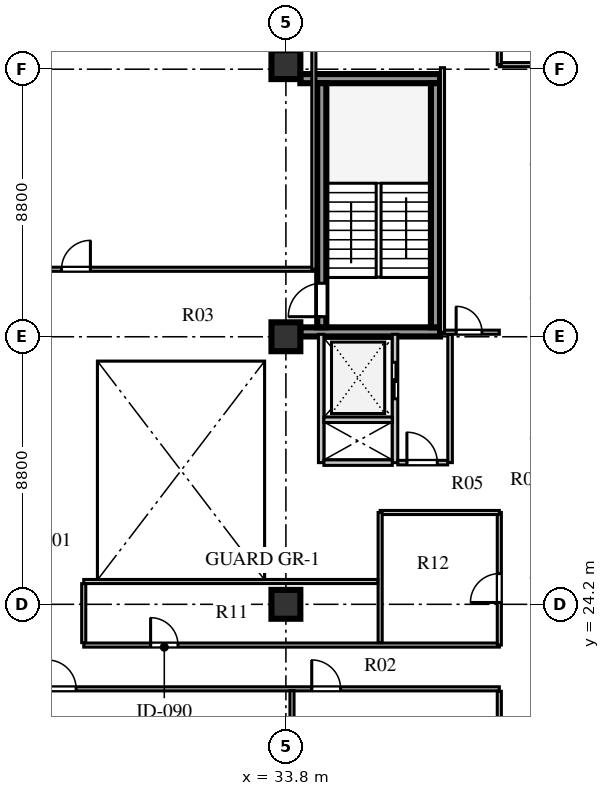
"""IFC4 building model, lengths in metres.
Left out: names, types, materials, properties, quantities, classifications, styles, units other than length and angle.
Written with IfcOpenShell. Run it as: python <this file> out.ifc"""

import sys

from ifc_helpers import new_model, si_unit, direction, frame, frame_2d, origin, origin_2d, place, context, subcontext, project, spatial, rectangle, extrude, element, fill, save


model = new_model("IFC4")
c1 = context("Model", 3, precision=1e-05, world=origin(), true_north=direction((0.0, 1.0)))
c2 = subcontext(c1, "Body", "Model", "MODEL_VIEW")
j1 = project(units=[si_unit("LENGTHUNIT", "METRE"), si_unit("PLANEANGLEUNIT", "RADIAN")], contexts=[c1])
p1 = place(None, origin())
s1 = spatial("IfcSite", under=j1, at=p1, CompositionType="ELEMENT")
p2 = place(p1, origin())
s2 = spatial("IfcBuilding", under=s1, at=p2, CompositionType="ELEMENT")
p3 = place(p2, frame((0.0, 0.0, 188.7)))
s3 = spatial("IfcBuildingStorey", under=s2, at=p3, CompositionType="ELEMENT", Elevation=188.7)
for number, where, z_axis, x_axis in (
    (1, (34.275, 33.16, 0.0), (0.0, 0.0, 1.0), (1.0, 0.0, 0.0)),
    (2, (34.275, 41.49, 0.0), (0.0, 0.0, 1.0), (1.0, 0.0, 0.0)),
):
    element("IfcWall", number, at=place(p3, frame(where, z_axis=z_axis, x_axis=x_axis)), inside=s3, PredefinedType="SHEAR", context=c2, shape_type="SweptSolid", body=[
        extrude(rectangle(XDim=4.595, YDim=0.3, at=frame_2d((2.298, 0.0))), origin(), (0.0, 0.0, 1.0), 3.6),
    ])
p4 = place(p3, frame((34.98, 33.31, 0.0), z_axis=(0.0, 0.0, 1.0), x_axis=(0.0, 1.0, 0.0)))
e3 = element("IfcWall", 3, at=p4, inside=s3, PredefinedType="SHEAR", context=c2, shape_type="SweptSolid", body=[
    extrude(rectangle(XDim=8.03, YDim=0.3, at=frame_2d((4.015, 0.0))), origin(), (0.0, 0.0, 1.0), 3.6),
])
p5 = place(p4, frame((0.35, 0.0, 0.0)))
e4 = element("IfcOpeningElement", 4, at=p5, cuts=e3, PredefinedType="OPENING", context=c2, shape_type="SweptSolid", body=[
    extrude(rectangle(XDim=1.1, YDim=2.1, at=frame_2d((0.55, 1.05))), frame((0.0, 0.16, 0.0), z_axis=(0.0, -1.0, 0.0), x_axis=(1.0, 0.0, 0.0)), (0.0, 0.0, 1.0), 0.32),
])
p6 = place(p3, frame((38.72, 33.31, 0.0), z_axis=(0.0, 0.0, 1.0), x_axis=(0.0, 1.0, 0.0)))
e5 = element("IfcWall", 5, at=p6, inside=s3, PredefinedType="SHEAR", context=c2, shape_type="SweptSolid", body=[
    extrude(rectangle(XDim=8.03, YDim=0.3, at=frame_2d((4.015, 0.0))), origin(), (0.0, 0.0, 1.0), 3.6),
])
for number, where, z_axis, x_axis in (
    (6, (33.8, 24.2, 0.0), (0.0, 0.0, 1.0), (1.0, 0.0, 0.0)),
    (7, (33.8, 33.0, 0.0), (0.0, 0.0, 1.0), (1.0, 0.0, 0.0)),
    (8, (33.8, 41.95, 0.0), (0.0, 0.0, 1.0), (1.0, 0.0, 0.0)),
):
    element("IfcColumn", number, at=place(p3, frame(where, z_axis=z_axis, x_axis=x_axis)), inside=s3, PredefinedType="COLUMN", context=c2, shape_type="SweptSolid", body=[
        extrude(rectangle(XDim=0.95, YDim=0.95, at=origin_2d()), origin(), (0.0, 0.0, 1.0), 3.6),
    ])
p7 = place(p3, frame((34.96, 28.86, 0.0), z_axis=(0.0, 0.0, 1.0), x_axis=(0.0, 1.0, 0.0)))
e9 = element("IfcWall", 9, at=p7, inside=s3, PredefinedType="SOLIDWALL", context=c2, shape_type="SweptSolid", body=[
    extrude(rectangle(XDim=4.22, YDim=0.18, at=frame_2d((2.11, 0.0))), origin(), (0.0, 0.0, 1.0), 3.6),
])
p8 = place(p3, frame((37.39, 28.86, 0.0), z_axis=(0.0, 0.0, 1.0), x_axis=(0.0, 1.0, 0.0)))
e10 = element("IfcWall", 10, at=p8, inside=s3, PredefinedType="SOLIDWALL", context=c2, shape_type="SweptSolid", body=[
    extrude(rectangle(XDim=4.22, YDim=0.18, at=frame_2d((2.11, 0.0))), origin(), (0.0, 0.0, 1.0), 3.6),
])
p9 = place(p8, frame((2.1, 0.0, 0.0)))
e11 = element("IfcOpeningElement", 11, at=p9, cuts=e10, PredefinedType="OPENING", context=c2, shape_type="SweptSolid", body=[
    extrude(rectangle(XDim=1.2, YDim=2.12, at=frame_2d((0.6, 1.06))), frame((0.0, 0.1, 0.0), z_axis=(0.0, -1.0, 0.0), x_axis=(1.0, 0.0, 0.0)), (0.0, 0.0, 1.0), 0.2),
])
for number, where, z_axis, x_axis in (
    (12, (35.05, 28.86, 0.0), (0.0, 0.0, 1.0), (1.0, 0.0, 0.0)),
    (13, (35.05, 30.27, 0.0), (0.0, 0.0, 1.0), (1.0, 0.0, 0.0)),
):
    element("IfcWall", number, at=place(p3, frame(where, z_axis=z_axis, x_axis=x_axis)), inside=s3, PredefinedType="SOLIDWALL", context=c2, shape_type="SweptSolid", body=[
        extrude(rectangle(XDim=2.25, YDim=0.18, at=frame_2d((1.125, 0.0))), origin(), (0.0, 0.0, 1.0), 3.6),
    ])
p10 = place(p3, frame((39.2, 28.86, 0.0), z_axis=(0.0, 0.0, 1.0), x_axis=(0.0, 1.0, 0.0)))
e14 = element("IfcWall", 14, at=p10, inside=s3, PredefinedType="PARTITIONING", context=c2, shape_type="SweptSolid", body=[
    extrude(rectangle(XDim=4.22, YDim=0.15, at=frame_2d((2.11, 0.0))), origin(), (0.0, 0.0, 1.0), 3.6),
])
p11 = place(p3, frame((37.48, 28.86, 0.0), z_axis=(0.0, 0.0, 1.0), x_axis=(1.0, 0.0, 0.0)))
e15 = element("IfcWall", 15, at=p11, inside=s3, PredefinedType="PARTITIONING", context=c2, shape_type="SweptSolid", body=[
    extrude(rectangle(XDim=1.64, YDim=0.15, at=frame_2d((0.82, 0.0))), origin(), (0.0, 0.0, 1.0), 3.6),
])
p12 = place(p11, frame((0.3, 0.0, 0.0)))
e16 = element("IfcOpeningElement", 16, at=p12, cuts=e15, PredefinedType="OPENING", context=c2, shape_type="SweptSolid", body=[
    extrude(rectangle(XDim=1.0, YDim=2.1, at=frame_2d((0.5, 1.05))), frame((0.0, 0.085, 0.0), z_axis=(0.0, -1.0, 0.0), x_axis=(1.0, 0.0, 0.0)), (0.0, 0.0, 1.0), 0.17),
])
p13 = place(p3, frame((25.22, 21.42, 0.0), z_axis=(0.0, 0.0, 1.0), x_axis=(1.0, 0.0, 0.0)))
e17 = element("IfcWall", 17, at=p13, inside=s3, PredefinedType="PARTITIONING", context=c2, shape_type="SweptSolid", body=[
    extrude(rectangle(XDim=15.6, YDim=0.135, at=frame_2d((7.8, 0.0))), origin(), (0.0, 0.0, 1.0), 3.25),
])
p14 = place(p13, frame((0.73, 0.0, 0.0)))
e18 = element("IfcOpeningElement", 18, at=p14, cuts=e17, PredefinedType="OPENING", context=c2, shape_type="SweptSolid", body=[
    extrude(rectangle(XDim=0.95, YDim=2.1, at=frame_2d((0.475, 1.05))), frame((0.0, 0.078, 0.0), z_axis=(0.0, -1.0, 0.0), x_axis=(1.0, 0.0, 0.0)), (0.0, 0.0, 1.0), 0.155),
])
p15 = place(p13, frame((9.43, 0.0, 0.0)))
e19 = element("IfcOpeningElement", 19, at=p15, cuts=e17, PredefinedType="OPENING", context=c2, shape_type="SweptSolid", body=[
    extrude(rectangle(XDim=0.95, YDim=2.1, at=frame_2d((0.475, 1.05))), frame((0.0, 0.078, 0.0), z_axis=(0.0, -1.0, 0.0), x_axis=(1.0, 0.0, 0.0)), (0.0, 0.0, 1.0), 0.155),
])
p16 = place(p3, frame((27.15, 22.86, 0.0), z_axis=(0.0, 0.0, 1.0), x_axis=(1.0, 0.0, 0.0)))
e20 = element("IfcWall", 20, at=p16, inside=s3, PredefinedType="PARTITIONING", context=c2, shape_type="SweptSolid", body=[
    extrude(rectangle(XDim=13.67, YDim=0.135, at=frame_2d((6.835, 0.0))), origin(), (0.0, 0.0, 1.0), 3.6),
])
p17 = place(p16, frame((2.2, 0.0, 0.0)))
e21 = element("IfcOpeningElement", 21, at=p17, cuts=e20, PredefinedType="OPENING", context=c2, shape_type="SweptSolid", body=[
    extrude(rectangle(XDim=0.9, YDim=2.08, at=frame_2d((0.45, 1.04))), frame((0.0, 0.078, 0.0), z_axis=(0.0, -1.0, 0.0), x_axis=(1.0, 0.0, 0.0)), (0.0, 0.0, 1.0), 0.155),
])
p18 = place(p3, frame((25.22, 35.22, 0.0), z_axis=(0.0, 0.0, 1.0), x_axis=(1.0, 0.0, 0.0)))
e22 = element("IfcWall", 22, at=p18, inside=s3, PredefinedType="PARTITIONING", context=c2, shape_type="SweptSolid", body=[
    extrude(rectangle(XDim=9.5, YDim=0.135, at=frame_2d((4.75, 0.0))), origin(), (0.0, 0.0, 1.0), 3.6),
])
p19 = place(p18, frame((1.2, 0.0, 0.0)))
e23 = element("IfcOpeningElement", 23, at=p19, cuts=e22, PredefinedType="OPENING", context=c2, shape_type="SweptSolid", body=[
    extrude(rectangle(XDim=0.95, YDim=2.1, at=frame_2d((0.475, 1.05))), frame((0.0, 0.078, 0.0), z_axis=(0.0, -1.0, 0.0), x_axis=(1.0, 0.0, 0.0)), (0.0, 0.0, 1.0), 0.155),
])
p20 = place(p3, frame((40.82, 41.95, 0.0), z_axis=(0.0, 0.0, 1.0), x_axis=(1.0, 0.0, 0.0)))
e24 = element("IfcWall", 24, at=p20, inside=s3, PredefinedType="PARTITIONING", context=c2, shape_type="SweptSolid", body=[
    extrude(rectangle(XDim=9.7, YDim=0.135, at=frame_2d((4.85, 0.0))), origin(), (0.0, 0.0, 1.0), 2.95),
])
p21 = place(p3, frame((40.82, 22.86, 0.0), z_axis=(0.0, 0.0, 1.0), x_axis=(0.0, 1.0, 0.0)))
e25 = element("IfcWall", 25, at=p21, inside=s3, PredefinedType="PARTITIONING", context=c2, shape_type="SweptSolid", body=[
    extrude(rectangle(XDim=4.36, YDim=0.135, at=frame_2d((2.18, 0.0))), origin(), (0.0, 0.0, 1.0), 3.6),
])
p22 = place(p21, frame((1.4, 0.0, 0.0)))
e26 = element("IfcOpeningElement", 26, at=p22, cuts=e25, PredefinedType="OPENING", context=c2, shape_type="SweptSolid", body=[
    extrude(rectangle(XDim=0.95, YDim=2.1, at=frame_2d((0.475, 1.05))), frame((0.0, 0.078, 0.0), z_axis=(0.0, -1.0, 0.0), x_axis=(1.0, 0.0, 0.0)), (0.0, 0.0, 1.0), 0.155),
])
p23 = place(p3, frame((36.9, 27.22, 0.0), z_axis=(0.0, 0.0, 1.0), x_axis=(1.0, 0.0, 0.0)))
e27 = element("IfcWall", 27, at=p23, inside=s3, PredefinedType="PARTITIONING", context=c2, shape_type="SweptSolid", body=[
    extrude(rectangle(XDim=3.92, YDim=0.135, at=frame_2d((1.96, 0.0))), origin(), (0.0, 0.0, 1.0), 3.25),
])
p24 = place(p3, frame((36.9, 22.94, 0.0), z_axis=(0.0, 0.0, 1.0), x_axis=(0.0, 1.0, 0.0)))
e28 = element("IfcWall", 28, at=p24, inside=s3, PredefinedType="PARTITIONING", context=c2, shape_type="SweptSolid", body=[
    extrude(rectangle(XDim=4.28, YDim=0.135, at=frame_2d((2.14, 0.0))), origin(), (0.0, 0.0, 1.0), 3.6),
])
p25 = place(p3, frame((27.15, 24.95, 0.0), z_axis=(0.0, 0.0, 1.0), x_axis=(1.0, 0.0, 0.0)))
e29 = element("IfcWall", 29, at=p25, inside=s3, PredefinedType="PARTITIONING", context=c2, shape_type="SweptSolid", body=[
    extrude(rectangle(XDim=9.67, YDim=0.135, at=frame_2d((4.835, 0.0))), origin(), (0.0, 0.0, 1.0), 3.05),
])
p26 = place(p3, frame((27.15, 22.94, 0.0), z_axis=(0.0, 0.0, 1.0), x_axis=(0.0, 1.0, 0.0)))
e30 = element("IfcWall", 30, at=p26, inside=s3, PredefinedType="PARTITIONING", context=c2, shape_type="SweptSolid", body=[
    extrude(rectangle(XDim=1.94, YDim=0.135, at=frame_2d((0.97, 0.0))), origin(), (0.0, 0.0, 1.0), 3.6),
])
p27 = place(p3, frame((40.82, 7.88, 0.0), z_axis=(0.0, 0.0, 1.0), x_axis=(0.0, 1.0, 0.0)))
e31 = element("IfcWall", 31, at=p27, inside=s3, PredefinedType="PARTITIONING", context=c2, shape_type="SweptSolid", body=[
    extrude(rectangle(XDim=13.46, YDim=0.135, at=frame_2d((6.73, 0.0))), origin(), (0.0, 0.0, 1.0), 3.6),
])
p28 = place(p3, frame((34.0, 7.88, 0.0), z_axis=(0.0, 0.0, 1.0), x_axis=(0.0, 1.0, 0.0)))
e32 = element("IfcWall", 32, at=p28, inside=s3, PredefinedType="PARTITIONING", context=c2, shape_type="SweptSolid", body=[
    extrude(rectangle(XDim=13.48, YDim=0.135, at=frame_2d((6.74, 0.0))), origin(), (0.0, 0.0, 1.0), 2.95),
])
p29 = place(p3, frame((34.72, 35.22, 0.0), z_axis=(0.0, 0.0, 1.0), x_axis=(0.0, 1.0, 0.0)))
e33 = element("IfcWall", 33, at=p29, inside=s3, PredefinedType="PARTITIONING", context=c2, shape_type="SweptSolid", body=[
    extrude(rectangle(XDim=14.1, YDim=0.135, at=frame_2d((7.05, 0.0))), origin(), (0.0, 0.0, 1.0), 3.6),
])
p30 = place(p3, frame((38.95, 33.15, 0.0), z_axis=(0.0, 0.0, 1.0), x_axis=(1.0, 0.0, 0.0)))
e34 = element("IfcWall", 34, at=p30, inside=s3, PredefinedType="PARTITIONING", context=c2, shape_type="SweptSolid", body=[
    extrude(rectangle(XDim=1.87, YDim=0.135, at=frame_2d((0.935, 0.0))), origin(), (0.0, 0.0, 1.0), 3.6),
])
p31 = place(p30, frame((0.45, 0.0, 0.0)))
e35 = element("IfcOpeningElement", 35, at=p31, cuts=e34, PredefinedType="OPENING", context=c2, shape_type="SweptSolid", body=[
    extrude(rectangle(XDim=0.85, YDim=2.05, at=frame_2d((0.425, 1.025))), frame((0.0, 0.078, 0.0), z_axis=(0.0, -1.0, 0.0), x_axis=(1.0, 0.0, 0.0)), (0.0, 0.0, 1.0), 0.155),
])
p32 = place(p3, frame((38.95, 33.15, 0.0), z_axis=(0.0, 0.0, 1.0), x_axis=(0.0, 1.0, 0.0)))
e36 = element("IfcWall", 36, at=p32, inside=s3, PredefinedType="PARTITIONING", context=c2, shape_type="SweptSolid", body=[
    extrude(rectangle(XDim=8.7, YDim=0.135, at=frame_2d((4.35, 0.0))), origin(), (0.0, 0.0, 1.0), 3.6),
])
p33 = place(p3, frame((40.82, 41.95, 0.0), z_axis=(0.0, 0.0, 1.0), x_axis=(0.0, 1.0, 0.0)))
e37 = element("IfcWall", 37, at=p33, inside=s3, PredefinedType="PARTITIONING", context=c2, shape_type="SweptSolid", body=[
    extrude(rectangle(XDim=7.37, YDim=0.135, at=frame_2d((3.685, 0.0))), origin(), (0.0, 0.0, 1.0), 3.6),
])
p34 = place(p5, origin())
e38 = element("IfcDoor", 38, at=p34, inside=s3, OperationType="SINGLE_SWING_LEFT", PredefinedType="DOOR", context=c2, shape_type="SweptSolid", body=[
    extrude(rectangle(XDim=1.1, YDim=2.1, at=frame_2d((0.55, 1.05))), frame((0.0, 0.025, 0.0), z_axis=(0.0, -1.0, 0.0), x_axis=(1.0, 0.0, 0.0)), (0.0, 0.0, 1.0), 0.05),
])
fill(e4, e38)
p35 = place(p9, frame((1.2, 0.0, 0.0), z_axis=(0.0, 0.0, 1.0), x_axis=(-1.0, 0.0, 0.0)))
e39 = element("IfcDoor", 39, at=p35, inside=s3, OperationType="DOUBLE_DOOR_SLIDING", PredefinedType="DOOR", context=c2, shape_type="SweptSolid", body=[
    extrude(rectangle(XDim=1.2, YDim=2.12, at=frame_2d((0.6, 1.06))), frame((0.0, 0.025, 0.0), z_axis=(0.0, -1.0, 0.0), x_axis=(1.0, 0.0, 0.0)), (0.0, 0.0, 1.0), 0.05),
])
fill(e11, e39)
p36 = place(p12, origin())
e40 = element("IfcDoor", 40, at=p36, inside=s3, OperationType="SINGLE_SWING_LEFT", PredefinedType="DOOR", context=c2, shape_type="SweptSolid", body=[
    extrude(rectangle(XDim=1.0, YDim=2.1, at=frame_2d((0.5, 1.05))), frame((0.0, 0.025, 0.0), z_axis=(0.0, -1.0, 0.0), x_axis=(1.0, 0.0, 0.0)), (0.0, 0.0, 1.0), 0.05),
])
fill(e16, e40)
p37 = place(p17, origin())
e41 = element("IfcDoor", 41, at=p37, inside=s3, OperationType="SINGLE_SWING_LEFT", PredefinedType="DOOR", context=c2, shape_type="SweptSolid", body=[
    extrude(rectangle(XDim=0.9, YDim=2.08, at=frame_2d((0.45, 1.04))), frame((0.0, 0.025, 0.0), z_axis=(0.0, -1.0, 0.0), x_axis=(1.0, 0.0, 0.0)), (0.0, 0.0, 1.0), 0.05),
])
fill(e21, e41)
p38 = place(p22, frame((0.95, 0.0, 0.0), z_axis=(0.0, 0.0, 1.0), x_axis=(-1.0, 0.0, 0.0)))
e42 = element("IfcDoor", 42, at=p38, inside=s3, OperationType="SINGLE_SWING_RIGHT", PredefinedType="DOOR", context=c2, shape_type="SweptSolid", body=[
    extrude(rectangle(XDim=0.95, YDim=2.1, at=frame_2d((0.475, 1.05))), frame((0.0, 0.025, 0.0), z_axis=(0.0, -1.0, 0.0), x_axis=(1.0, 0.0, 0.0)), (0.0, 0.0, 1.0), 0.05),
])
fill(e26, e42)
p39 = place(p14, frame((0.95, 0.0, 0.0), z_axis=(0.0, 0.0, 1.0), x_axis=(-1.0, 0.0, 0.0)))
e43 = element("IfcDoor", 43, at=p39, inside=s3, OperationType="SINGLE_SWING_RIGHT", PredefinedType="DOOR", context=c2, shape_type="SweptSolid", body=[
    extrude(rectangle(XDim=0.95, YDim=2.1, at=frame_2d((0.475, 1.05))), frame((0.0, 0.025, 0.0), z_axis=(0.0, -1.0, 0.0), x_axis=(1.0, 0.0, 0.0)), (0.0, 0.0, 1.0), 0.05),
])
fill(e18, e43)
p40 = place(p15, frame((0.95, 0.0, 0.0), z_axis=(0.0, 0.0, 1.0), x_axis=(-1.0, 0.0, 0.0)))
e44 = element("IfcDoor", 44, at=p40, inside=s3, OperationType="SINGLE_SWING_RIGHT", PredefinedType="DOOR", context=c2, shape_type="SweptSolid", body=[
    extrude(rectangle(XDim=0.95, YDim=2.1, at=frame_2d((0.475, 1.05))), frame((0.0, 0.025, 0.0), z_axis=(0.0, -1.0, 0.0), x_axis=(1.0, 0.0, 0.0)), (0.0, 0.0, 1.0), 0.05),
])
fill(e19, e44)
p41 = place(p19, origin())
e45 = element("IfcDoor", 45, at=p41, inside=s3, OperationType="SINGLE_SWING_RIGHT", PredefinedType="DOOR", context=c2, shape_type="SweptSolid", body=[
    extrude(rectangle(XDim=0.95, YDim=2.1, at=frame_2d((0.475, 1.05))), frame((0.0, 0.025, 0.0), z_axis=(0.0, -1.0, 0.0), x_axis=(1.0, 0.0, 0.0)), (0.0, 0.0, 1.0), 0.05),
])
fill(e23, e45)
p42 = place(p31, origin())
e46 = element("IfcDoor", 46, at=p42, inside=s3, OperationType="SINGLE_SWING_LEFT", PredefinedType="DOOR", context=c2, shape_type="SweptSolid", body=[
    extrude(rectangle(XDim=0.85, YDim=2.05, at=frame_2d((0.425, 1.025))), frame((0.0, 0.025, 0.0), z_axis=(0.0, -1.0, 0.0), x_axis=(1.0, 0.0, 0.0)), (0.0, 0.0, 1.0), 0.05),
])
fill(e35, e46)
save(model, sys.argv[1])
